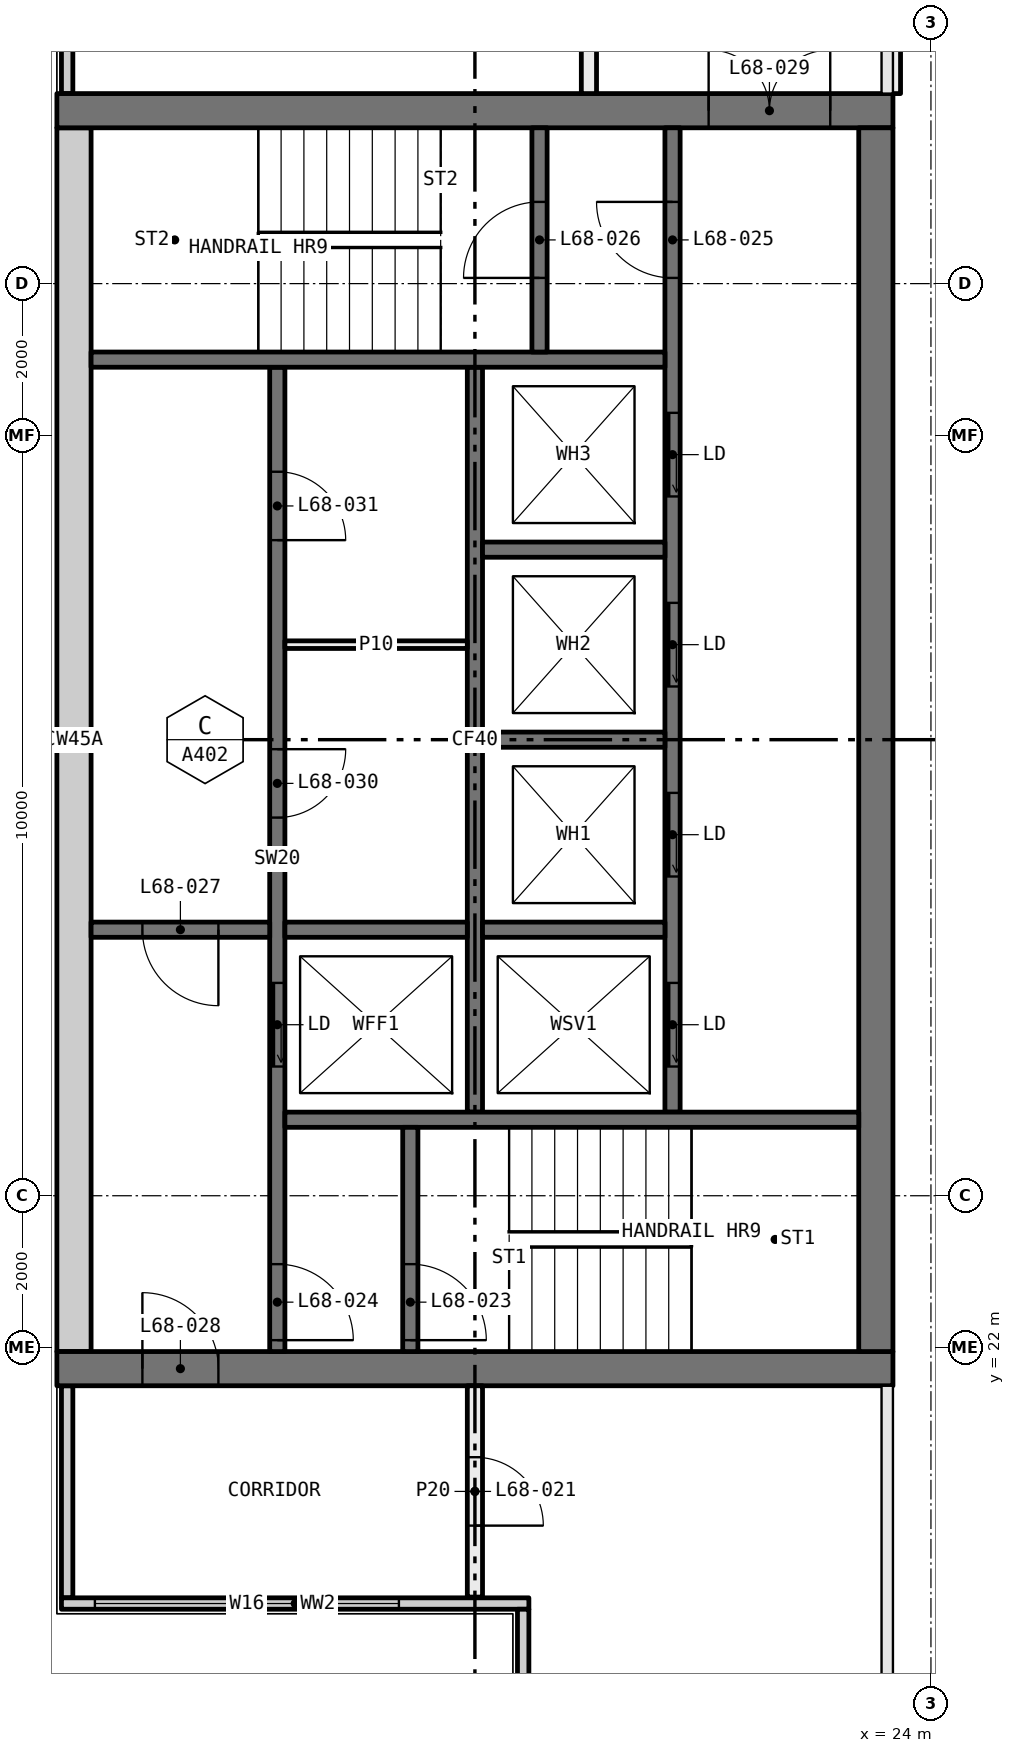
"""IFC4 building model, lengths in metres.
Left out: names, types, materials, properties, quantities, classifications, styles, units other than length and angle.
Written with IfcOpenShell. Run it as: python <this file> out.ifc"""

import sys

from ifc_helpers import new_model, si_unit, direction, frame, frame_2d, origin, place, context, subcontext, project, spatial, rectangle, extrude, element, fill, save


model = new_model("IFC4")
c1 = context("Model", 3, precision=1e-05, world=origin(), true_north=direction((0.0, 1.0)))
c2 = subcontext(c1, "Body", "Model", "MODEL_VIEW")
j1 = project(units=[si_unit("LENGTHUNIT", "METRE"), si_unit("PLANEANGLEUNIT", "RADIAN")], contexts=[c1])
p1 = place(None, origin())
s1 = spatial("IfcSite", under=j1, at=p1, CompositionType="ELEMENT")
p2 = place(p1, origin())
s2 = spatial("IfcBuilding", under=s1, at=p2, CompositionType="ELEMENT")
p3 = place(p2, frame((0.0, 0.0, 252.45)))
s3 = spatial("IfcBuildingStorey", under=s2, at=p3, CompositionType="ELEMENT", Elevation=252.45)
for number, where, z_axis, x_axis in (
    (1, (12.635, 18.71, 0.0), (0.0, 0.0, 1.0), (0.0, 1.0, 0.0)),
    (2, (12.635, 38.5, 0.0), (0.0, 0.0, 1.0), (0.0, 1.0, 0.0)),
):
    element("IfcWall", number, at=place(p3, frame(where, z_axis=z_axis, x_axis=x_axis)), inside=s3, PredefinedType="ELEMENTEDWALL", context=c2, shape_type="SweptSolid", body=[
        extrude(rectangle(XDim=2.79, YDim=0.15, at=frame_2d((1.395, 0.0))), origin(), (0.0, 0.0, 1.0), 3.05),
    ])
p4 = place(p3, frame((12.56, 18.635, 0.0), z_axis=(0.0, 0.0, 1.0), x_axis=(1.0, 0.0, 0.0)))
e3 = element("IfcWall", 3, at=p4, inside=s3, PredefinedType="ELEMENTEDWALL", context=c2, shape_type="SweptSolid", body=[
    extrude(rectangle(XDim=6.15, YDim=0.15, at=frame_2d((3.075, 0.0))), origin(), (0.0, 0.0, 1.0), 3.05),
])
p5 = place(p4, frame((0.44, 0.0, 0.45)))
e4 = element("IfcOpeningElement", 4, at=p5, cuts=e3, PredefinedType="OPENING", context=c2, shape_type="SweptSolid", body=[
    extrude(rectangle(XDim=4.0, YDim=2.55, at=frame_2d((2.0, 1.275))), frame((0.0, 0.085, 0.0), z_axis=(0.0, -1.0, 0.0), x_axis=(1.0, 0.0, 0.0)), (0.0, 0.0, 1.0), 0.17),
])
p6 = place(p3, frame((18.635, 12.71, 0.0), z_axis=(0.0, 0.0, 1.0), x_axis=(0.0, 1.0, 0.0)))
e5 = element("IfcWall", 5, at=p6, inside=s3, PredefinedType="ELEMENTEDWALL", context=c2, shape_type="SweptSolid", body=[
    extrude(rectangle(XDim=5.85, YDim=0.15, at=frame_2d((2.925, 0.0))), origin(), (0.0, 0.0, 1.0), 3.05),
])
p7 = place(p6, frame((0.29, 0.0, 0.45)))
e6 = element("IfcOpeningElement", 6, at=p7, cuts=e5, PredefinedType="OPENING", context=c2, shape_type="SweptSolid", body=[
    extrude(rectangle(XDim=4.0, YDim=2.55, at=frame_2d((2.0, 1.275))), frame((0.0, 0.085, 0.0), z_axis=(0.0, -1.0, 0.0), x_axis=(1.0, 0.0, 0.0)), (0.0, 0.0, 1.0), 0.17),
])
p8 = place(p3, frame((18.0, 21.5, 0.0), z_axis=(0.0, 0.0, 1.0), x_axis=(0.0, -1.0, 0.0)))
e7 = element("IfcWall", 7, at=p8, inside=s3, PredefinedType="PARTITIONING", context=c2, shape_type="SweptSolid", body=[
    extrude(rectangle(XDim=2.78, YDim=0.2, at=frame_2d((1.39, 0.0))), origin(), (0.0, 0.0, 1.0), 3.05),
])
p9 = place(p8, frame((0.94, 0.0, 0.0)))
e8 = element("IfcOpeningElement", 8, at=p9, cuts=e7, PredefinedType="OPENING", context=c2, shape_type="SweptSolid", body=[
    extrude(rectangle(XDim=0.9, YDim=2.1, at=frame_2d((0.45, 1.05))), frame((0.0, 0.11, 0.0), z_axis=(0.0, -1.0, 0.0), x_axis=(1.0, 0.0, 0.0)), (0.0, 0.0, 1.0), 0.22),
])
p10 = place(p3, frame((19.5, 38.5, 0.0), z_axis=(0.0, 0.0, 1.0), x_axis=(0.0, 1.0, 0.0)))
e9 = element("IfcWall", 9, at=p10, inside=s3, PredefinedType="PARTITIONING", context=c2, shape_type="SweptSolid", body=[
    extrude(rectangle(XDim=3.5, YDim=0.2, at=frame_2d((1.75, 0.0))), origin(), (0.0, 0.0, 1.0), 3.05),
])
p11 = place(p3, frame((23.5, 41.9, 0.0), z_axis=(0.0, 0.0, 1.0), x_axis=(0.0, -1.0, 0.0)))
e10 = element("IfcWall", 10, at=p11, inside=s3, PredefinedType="PARTITIONING", context=c2, shape_type="SweptSolid", body=[
    extrude(rectangle(XDim=3.4, YDim=0.2, at=frame_2d((1.7, 0.0))), origin(), (0.0, 0.0, 1.0), 3.05),
])
p12 = place(p3, frame((12.5, 21.725, 0.0), z_axis=(0.0, 0.0, 1.0), x_axis=(1.0, 0.0, 0.0)))
e11 = element("IfcWall", 11, at=p12, inside=s3, PredefinedType="SHEAR", context=c2, shape_type="SweptSolid", body=[
    extrude(rectangle(XDim=11.0, YDim=0.45, at=frame_2d((5.5, 0.0))), origin(), (0.0, 0.0, 1.0), 3.05),
])
p13 = place(p12, frame((1.125, 0.0, 0.0)))
e12 = element("IfcOpeningElement", 12, at=p13, cuts=e11, PredefinedType="OPENING", context=c2, shape_type="SweptSolid", body=[
    extrude(rectangle(XDim=1.0, YDim=2.1, at=frame_2d((0.5, 1.05))), frame((0.0, 0.235, 0.0), z_axis=(0.0, -1.0, 0.0), x_axis=(1.0, 0.0, 0.0)), (0.0, 0.0, 1.0), 0.47),
])
p14 = place(p3, frame((12.5, 38.275, 0.0), z_axis=(0.0, 0.0, 1.0), x_axis=(1.0, 0.0, 0.0)))
e13 = element("IfcWall", 13, at=p14, inside=s3, PredefinedType="SHEAR", context=c2, shape_type="SweptSolid", body=[
    extrude(rectangle(XDim=11.0, YDim=0.45, at=frame_2d((5.5, 0.0))), origin(), (0.0, 0.0, 1.0), 3.05),
])
p15 = place(p14, frame((8.575, 0.0, 0.0)))
e14 = element("IfcOpeningElement", 14, at=p15, cuts=e13, PredefinedType="OPENING", context=c2, shape_type="SweptSolid", body=[
    extrude(rectangle(XDim=1.6, YDim=2.1, at=frame_2d((0.8, 1.05))), frame((0.0, 0.235, 0.0), z_axis=(0.0, -1.0, 0.0), x_axis=(1.0, 0.0, 0.0)), (0.0, 0.0, 1.0), 0.47),
])
for number, where, z_axis, x_axis in (
    (15, (12.725, 21.95, 0.0), (0.0, 0.0, 1.0), (0.0, 1.0, 0.0)),
    (16, (23.275, 21.95, 0.0), (0.0, 0.0, 1.0), (0.0, 1.0, 0.0)),
):
    element("IfcWall", number, at=place(p3, frame(where, z_axis=z_axis, x_axis=x_axis)), inside=s3, PredefinedType="SHEAR", context=c2, shape_type="SweptSolid", body=[
        extrude(rectangle(XDim=16.1, YDim=0.45, at=frame_2d((8.05, 0.0))), origin(), (0.0, 0.0, 1.0), 3.05),
    ])
p16 = place(p3, frame((15.4, 21.95, 0.0), z_axis=(0.0, 0.0, 1.0), x_axis=(0.0, 1.0, 0.0)))
e17 = element("IfcWall", 17, at=p16, inside=s3, PredefinedType="SOLIDWALL", context=c2, shape_type="SweptSolid", body=[
    extrude(rectangle(XDim=12.95, YDim=0.2, at=frame_2d((6.475, 0.0))), origin(), (0.0, 0.0, 1.0), 3.05),
])
p17 = place(p16, frame((3.75, 0.0, 0.0)))
e18 = element("IfcOpeningElement", 18, at=p17, cuts=e17, PredefinedType="OPENING", context=c2, shape_type="SweptSolid", body=[
    extrude(rectangle(XDim=1.1, YDim=2.1, at=frame_2d((0.55, 1.05))), frame((0.0, 0.11, 0.0), z_axis=(0.0, -1.0, 0.0), x_axis=(1.0, 0.0, 0.0)), (0.0, 0.0, 1.0), 0.22),
])
p18 = place(p16, frame((0.15, 0.0, 0.0)))
e19 = element("IfcOpeningElement", 19, at=p18, cuts=e17, PredefinedType="OPENING", context=c2, shape_type="SweptSolid", body=[
    extrude(rectangle(XDim=1.0, YDim=2.1, at=frame_2d((0.5, 1.05))), frame((0.0, 0.11, 0.0), z_axis=(0.0, -1.0, 0.0), x_axis=(1.0, 0.0, 0.0)), (0.0, 0.0, 1.0), 0.22),
])
p19 = place(p16, frame((7.025, 0.0, 0.0)))
e20 = element("IfcOpeningElement", 20, at=p19, cuts=e17, PredefinedType="OPENING", context=c2, shape_type="SweptSolid", body=[
    extrude(rectangle(XDim=0.9, YDim=2.1, at=frame_2d((0.45, 1.05))), frame((0.0, 0.11, 0.0), z_axis=(0.0, -1.0, 0.0), x_axis=(1.0, 0.0, 0.0)), (0.0, 0.0, 1.0), 0.22),
])
p20 = place(p16, frame((10.675, 0.0, 0.0)))
e21 = element("IfcOpeningElement", 21, at=p20, cuts=e17, PredefinedType="OPENING", context=c2, shape_type="SweptSolid", body=[
    extrude(rectangle(XDim=0.9, YDim=2.1, at=frame_2d((0.45, 1.05))), frame((0.0, 0.11, 0.0), z_axis=(0.0, -1.0, 0.0), x_axis=(1.0, 0.0, 0.0)), (0.0, 0.0, 1.0), 0.22),
])
p21 = place(p3, frame((20.6, 25.1, 0.0), z_axis=(0.0, 0.0, 1.0), x_axis=(0.0, 1.0, 0.0)))
e22 = element("IfcWall", 22, at=p21, inside=s3, PredefinedType="SOLIDWALL", context=c2, shape_type="SweptSolid", body=[
    extrude(rectangle(XDim=12.95, YDim=0.2, at=frame_2d((6.475, 0.0))), origin(), (0.0, 0.0, 1.0), 3.05),
])
p22 = place(p21, frame((0.6, 0.0, 0.0)))
e23 = element("IfcOpeningElement", 23, at=p22, cuts=e22, PredefinedType="OPENING", context=c2, shape_type="SweptSolid", body=[
    extrude(rectangle(XDim=1.1, YDim=2.1, at=frame_2d((0.55, 1.05))), frame((0.0, 0.11, 0.0), z_axis=(0.0, -1.0, 0.0), x_axis=(1.0, 0.0, 0.0)), (0.0, 0.0, 1.0), 0.22),
])
p23 = place(p21, frame((3.1, 0.0, 0.0)))
e24 = element("IfcOpeningElement", 24, at=p23, cuts=e22, PredefinedType="OPENING", context=c2, shape_type="SweptSolid", body=[
    extrude(rectangle(XDim=1.1, YDim=2.1, at=frame_2d((0.55, 1.05))), frame((0.0, 0.11, 0.0), z_axis=(0.0, -1.0, 0.0), x_axis=(1.0, 0.0, 0.0)), (0.0, 0.0, 1.0), 0.22),
])
p24 = place(p21, frame((5.6, 0.0, 0.0)))
e25 = element("IfcOpeningElement", 25, at=p24, cuts=e22, PredefinedType="OPENING", context=c2, shape_type="SweptSolid", body=[
    extrude(rectangle(XDim=1.1, YDim=2.1, at=frame_2d((0.55, 1.05))), frame((0.0, 0.11, 0.0), z_axis=(0.0, -1.0, 0.0), x_axis=(1.0, 0.0, 0.0)), (0.0, 0.0, 1.0), 0.22),
])
p25 = place(p21, frame((8.1, 0.0, 0.0)))
e26 = element("IfcOpeningElement", 26, at=p25, cuts=e22, PredefinedType="OPENING", context=c2, shape_type="SweptSolid", body=[
    extrude(rectangle(XDim=1.1, YDim=2.1, at=frame_2d((0.55, 1.05))), frame((0.0, 0.11, 0.0), z_axis=(0.0, -1.0, 0.0), x_axis=(1.0, 0.0, 0.0)), (0.0, 0.0, 1.0), 0.22),
])
p26 = place(p21, frame((10.975, 0.0, 0.0)))
e27 = element("IfcOpeningElement", 27, at=p26, cuts=e22, PredefinedType="OPENING", context=c2, shape_type="SweptSolid", body=[
    extrude(rectangle(XDim=1.0, YDim=2.1, at=frame_2d((0.5, 1.05))), frame((0.0, 0.11, 0.0), z_axis=(0.0, -1.0, 0.0), x_axis=(1.0, 0.0, 0.0)), (0.0, 0.0, 1.0), 0.22),
])
p27 = place(p3, frame((18.0, 25.1, 0.0), z_axis=(0.0, 0.0, 1.0), x_axis=(0.0, 1.0, 0.0)))
e28 = element("IfcWall", 28, at=p27, inside=s3, PredefinedType="SOLIDWALL", context=c2, shape_type="SweptSolid", body=[
    extrude(rectangle(XDim=9.8, YDim=0.2, at=frame_2d((4.9, 0.0))), origin(), (0.0, 0.0, 1.0), 3.05),
])
for number, where, z_axis, x_axis in (
    (29, (15.5, 25.0, 0.0), (0.0, 0.0, 1.0), (1.0, 0.0, 0.0)),
    (30, (12.95, 35.0, 0.0), (0.0, 0.0, 1.0), (1.0, 0.0, 0.0)),
):
    element("IfcWall", number, at=place(p3, frame(where, z_axis=z_axis, x_axis=x_axis)), inside=s3, PredefinedType="SOLIDWALL", context=c2, shape_type="SweptSolid", body=[
        extrude(rectangle(XDim=7.55, YDim=0.2, at=frame_2d((3.775, 0.0))), origin(), (0.0, 0.0, 1.0), 3.05),
    ])
p28 = place(p3, frame((12.95, 27.5, 0.0), z_axis=(0.0, 0.0, 1.0), x_axis=(1.0, 0.0, 0.0)))
e31 = element("IfcWall", 31, at=p28, inside=s3, PredefinedType="SOLIDWALL", context=c2, shape_type="SweptSolid", body=[
    extrude(rectangle(XDim=2.35, YDim=0.2, at=frame_2d((1.175, 0.0))), origin(), (0.0, 0.0, 1.0), 3.05),
])
p29 = place(p28, frame((0.675, 0.0, 0.0)))
e32 = element("IfcOpeningElement", 32, at=p29, cuts=e31, PredefinedType="OPENING", context=c2, shape_type="SweptSolid", body=[
    extrude(rectangle(XDim=1.0, YDim=2.1, at=frame_2d((0.5, 1.05))), frame((0.0, 0.11, 0.0), z_axis=(0.0, -1.0, 0.0), x_axis=(1.0, 0.0, 0.0)), (0.0, 0.0, 1.0), 0.22),
])
p30 = place(p3, frame((17.15, 21.95, 0.0), z_axis=(0.0, 0.0, 1.0), x_axis=(0.0, 1.0, 0.0)))
e33 = element("IfcWall", 33, at=p30, inside=s3, PredefinedType="SOLIDWALL", context=c2, shape_type="SweptSolid", body=[
    extrude(rectangle(XDim=2.95, YDim=0.2, at=frame_2d((1.475, 0.0))), origin(), (0.0, 0.0, 1.0), 3.05),
])
p31 = place(p30, frame((0.15, 0.0, 0.0)))
e34 = element("IfcOpeningElement", 34, at=p31, cuts=e33, PredefinedType="OPENING", context=c2, shape_type="SweptSolid", body=[
    extrude(rectangle(XDim=1.0, YDim=2.1, at=frame_2d((0.5, 1.05))), frame((0.0, 0.11, 0.0), z_axis=(0.0, -1.0, 0.0), x_axis=(1.0, 0.0, 0.0)), (0.0, 0.0, 1.0), 0.22),
])
p32 = place(p3, frame((18.85, 35.1, 0.0), z_axis=(0.0, 0.0, 1.0), x_axis=(0.0, 1.0, 0.0)))
e35 = element("IfcWall", 35, at=p32, inside=s3, PredefinedType="SOLIDWALL", context=c2, shape_type="SweptSolid", body=[
    extrude(rectangle(XDim=2.95, YDim=0.2, at=frame_2d((1.475, 0.0))), origin(), (0.0, 0.0, 1.0), 3.05),
])
p33 = place(p32, frame((0.975, 0.0, 0.0)))
e36 = element("IfcOpeningElement", 36, at=p33, cuts=e35, PredefinedType="OPENING", context=c2, shape_type="SweptSolid", body=[
    extrude(rectangle(XDim=1.0, YDim=2.1, at=frame_2d((0.5, 1.05))), frame((0.0, 0.11, 0.0), z_axis=(0.0, -1.0, 0.0), x_axis=(1.0, 0.0, 0.0)), (0.0, 0.0, 1.0), 0.22),
])
for number, where, z_axis, x_axis in (
    (37, (15.5, 27.5, 0.0), (0.0, 0.0, 1.0), (1.0, 0.0, 0.0)),
    (38, (18.1, 27.5, 0.0), (0.0, 0.0, 1.0), (1.0, 0.0, 0.0)),
    (39, (18.1, 30.0, 0.0), (0.0, 0.0, 1.0), (1.0, 0.0, 0.0)),
    (40, (18.1, 32.5, 0.0), (0.0, 0.0, 1.0), (1.0, 0.0, 0.0)),
):
    element("IfcWall", number, at=place(p3, frame(where, z_axis=z_axis, x_axis=x_axis)), inside=s3, PredefinedType="SOLIDWALL", context=c2, shape_type="SweptSolid", body=[
        extrude(rectangle(XDim=2.4, YDim=0.2, at=frame_2d((1.2, 0.0))), origin(), (0.0, 0.0, 1.0), 3.05),
    ])
p34 = place(p3, frame((15.5, 31.25, 0.0), z_axis=(0.0, 0.0, 1.0), x_axis=(1.0, 0.0, 0.0)))
e41 = element("IfcWall", 41, at=p34, inside=s3, PredefinedType="PARTITIONING", context=c2, shape_type="SweptSolid", body=[
    extrude(rectangle(XDim=2.4, YDim=0.1, at=frame_2d((1.2, 0.0))), origin(), (0.0, 0.0, 1.0), 3.05),
])
p35 = place(p5, origin())
e42 = element("IfcWindow", 42, at=p35, inside=s3, PartitioningType="SINGLE_PANEL", PredefinedType="WINDOW", context=c2, shape_type="SweptSolid", body=[
    extrude(rectangle(XDim=4.0, YDim=2.55, at=frame_2d((2.0, 1.275))), frame((0.0, 0.03, 0.0), z_axis=(0.0, -1.0, 0.0), x_axis=(1.0, 0.0, 0.0)), (0.0, 0.0, 1.0), 0.06),
])
fill(e4, e42)
p36 = place(p9, origin())
e43 = element("IfcDoor", 43, at=p36, inside=s3, OperationType="SINGLE_SWING_LEFT", PredefinedType="DOOR", context=c2, shape_type="SweptSolid", body=[
    extrude(rectangle(XDim=0.9, YDim=2.1, at=frame_2d((0.45, 1.05))), frame((0.0, 0.025, 0.0), z_axis=(0.0, -1.0, 0.0), x_axis=(1.0, 0.0, 0.0)), (0.0, 0.0, 1.0), 0.05),
])
fill(e8, e43)
p37 = place(p22, origin())
e44 = element("IfcDoor", 44, at=p37, inside=s3, OperationType="SLIDING_TO_LEFT", PredefinedType="DOOR", context=c2, shape_type="SweptSolid", body=[
    extrude(rectangle(XDim=1.1, YDim=2.1, at=frame_2d((0.55, 1.05))), frame((0.0, 0.025, 0.0), z_axis=(0.0, -1.0, 0.0), x_axis=(1.0, 0.0, 0.0)), (0.0, 0.0, 1.0), 0.05),
])
fill(e23, e44)
p38 = place(p23, origin())
e45 = element("IfcDoor", 45, at=p38, inside=s3, OperationType="SLIDING_TO_LEFT", PredefinedType="DOOR", context=c2, shape_type="SweptSolid", body=[
    extrude(rectangle(XDim=1.1, YDim=2.1, at=frame_2d((0.55, 1.05))), frame((0.0, 0.025, 0.0), z_axis=(0.0, -1.0, 0.0), x_axis=(1.0, 0.0, 0.0)), (0.0, 0.0, 1.0), 0.05),
])
fill(e24, e45)
p39 = place(p24, origin())
e46 = element("IfcDoor", 46, at=p39, inside=s3, OperationType="SLIDING_TO_LEFT", PredefinedType="DOOR", context=c2, shape_type="SweptSolid", body=[
    extrude(rectangle(XDim=1.1, YDim=2.1, at=frame_2d((0.55, 1.05))), frame((0.0, 0.025, 0.0), z_axis=(0.0, -1.0, 0.0), x_axis=(1.0, 0.0, 0.0)), (0.0, 0.0, 1.0), 0.05),
])
fill(e25, e46)
p40 = place(p25, origin())
e47 = element("IfcDoor", 47, at=p40, inside=s3, OperationType="SLIDING_TO_LEFT", PredefinedType="DOOR", context=c2, shape_type="SweptSolid", body=[
    extrude(rectangle(XDim=1.1, YDim=2.1, at=frame_2d((0.55, 1.05))), frame((0.0, 0.025, 0.0), z_axis=(0.0, -1.0, 0.0), x_axis=(1.0, 0.0, 0.0)), (0.0, 0.0, 1.0), 0.05),
])
fill(e26, e47)
p41 = place(p17, origin())
e48 = element("IfcDoor", 48, at=p41, inside=s3, OperationType="SLIDING_TO_LEFT", PredefinedType="DOOR", context=c2, shape_type="SweptSolid", body=[
    extrude(rectangle(XDim=1.1, YDim=2.1, at=frame_2d((0.55, 1.05))), frame((0.0, 0.025, 0.0), z_axis=(0.0, -1.0, 0.0), x_axis=(1.0, 0.0, 0.0)), (0.0, 0.0, 1.0), 0.05),
])
fill(e18, e48)
p42 = place(p31, frame((1.0, 0.0, 0.0), x_axis=(-1.0, 0.0, 0.0)))
e49 = element("IfcDoor", 49, at=p42, inside=s3, OperationType="SINGLE_SWING_LEFT", PredefinedType="DOOR", context=c2, shape_type="SweptSolid", body=[
    extrude(rectangle(XDim=1.0, YDim=2.1, at=frame_2d((0.5, 1.05))), frame((0.0, 0.025, 0.0), z_axis=(0.0, -1.0, 0.0), x_axis=(1.0, 0.0, 0.0)), (0.0, 0.0, 1.0), 0.05),
])
fill(e34, e49)
p43 = place(p18, frame((1.0, 0.0, 0.0), x_axis=(-1.0, 0.0, 0.0)))
e50 = element("IfcDoor", 50, at=p43, inside=s3, OperationType="SINGLE_SWING_LEFT", PredefinedType="DOOR", context=c2, shape_type="SweptSolid", body=[
    extrude(rectangle(XDim=1.0, YDim=2.1, at=frame_2d((0.5, 1.05))), frame((0.0, 0.025, 0.0), z_axis=(0.0, -1.0, 0.0), x_axis=(1.0, 0.0, 0.0)), (0.0, 0.0, 1.0), 0.05),
])
fill(e19, e50)
p44 = place(p26, origin())
e51 = element("IfcDoor", 51, at=p44, inside=s3, OperationType="SINGLE_SWING_LEFT", PredefinedType="DOOR", context=c2, shape_type="SweptSolid", body=[
    extrude(rectangle(XDim=1.0, YDim=2.1, at=frame_2d((0.5, 1.05))), frame((0.0, 0.025, 0.0), z_axis=(0.0, -1.0, 0.0), x_axis=(1.0, 0.0, 0.0)), (0.0, 0.0, 1.0), 0.05),
])
fill(e27, e51)
p45 = place(p33, origin())
e52 = element("IfcDoor", 52, at=p45, inside=s3, OperationType="SINGLE_SWING_RIGHT", PredefinedType="DOOR", context=c2, shape_type="SweptSolid", body=[
    extrude(rectangle(XDim=1.0, YDim=2.1, at=frame_2d((0.5, 1.05))), frame((0.0, 0.025, 0.0), z_axis=(0.0, -1.0, 0.0), x_axis=(1.0, 0.0, 0.0)), (0.0, 0.0, 1.0), 0.05),
])
fill(e36, e52)
p46 = place(p29, frame((1.0, 0.0, 0.0), x_axis=(-1.0, 0.0, 0.0)))
e53 = element("IfcDoor", 53, at=p46, inside=s3, OperationType="SINGLE_SWING_RIGHT", PredefinedType="DOOR", context=c2, shape_type="SweptSolid", body=[
    extrude(rectangle(XDim=1.0, YDim=2.1, at=frame_2d((0.5, 1.05))), frame((0.0, 0.025, 0.0), z_axis=(0.0, -1.0, 0.0), x_axis=(1.0, 0.0, 0.0)), (0.0, 0.0, 1.0), 0.05),
])
fill(e32, e53)
p47 = place(p13, origin())
e54 = element("IfcDoor", 54, at=p47, inside=s3, OperationType="SINGLE_SWING_RIGHT", PredefinedType="DOOR", context=c2, shape_type="SweptSolid", body=[
    extrude(rectangle(XDim=1.0, YDim=2.1, at=frame_2d((0.5, 1.05))), frame((0.0, 0.025, 0.0), z_axis=(0.0, -1.0, 0.0), x_axis=(1.0, 0.0, 0.0)), (0.0, 0.0, 1.0), 0.05),
])
fill(e12, e54)
p48 = place(p15, origin())
e55 = element("IfcDoor", 55, at=p48, inside=s3, OperationType="DOUBLE_DOOR_SINGLE_SWING", PredefinedType="DOOR", context=c2, shape_type="SweptSolid", body=[
    extrude(rectangle(XDim=1.6, YDim=2.1, at=frame_2d((0.8, 1.05))), frame((0.0, 0.025, 0.0), z_axis=(0.0, -1.0, 0.0), x_axis=(1.0, 0.0, 0.0)), (0.0, 0.0, 1.0), 0.05),
])
fill(e14, e55)
p49 = place(p19, frame((0.9, 0.0, 0.0), x_axis=(-1.0, 0.0, 0.0)))
e56 = element("IfcDoor", 56, at=p49, inside=s3, OperationType="SINGLE_SWING_RIGHT", PredefinedType="DOOR", context=c2, shape_type="SweptSolid", body=[
    extrude(rectangle(XDim=0.9, YDim=2.1, at=frame_2d((0.45, 1.05))), frame((0.0, 0.025, 0.0), z_axis=(0.0, -1.0, 0.0), x_axis=(1.0, 0.0, 0.0)), (0.0, 0.0, 1.0), 0.05),
])
fill(e20, e56)
p50 = place(p20, frame((0.9, 0.0, 0.0), x_axis=(-1.0, 0.0, 0.0)))
e57 = element("IfcDoor", 57, at=p50, inside=s3, OperationType="SINGLE_SWING_LEFT", PredefinedType="DOOR", context=c2, shape_type="SweptSolid", body=[
    extrude(rectangle(XDim=0.9, YDim=2.1, at=frame_2d((0.45, 1.05))), frame((0.0, 0.025, 0.0), z_axis=(0.0, -1.0, 0.0), x_axis=(1.0, 0.0, 0.0)), (0.0, 0.0, 1.0), 0.05),
])
fill(e21, e57)
save(model, sys.argv[1])
